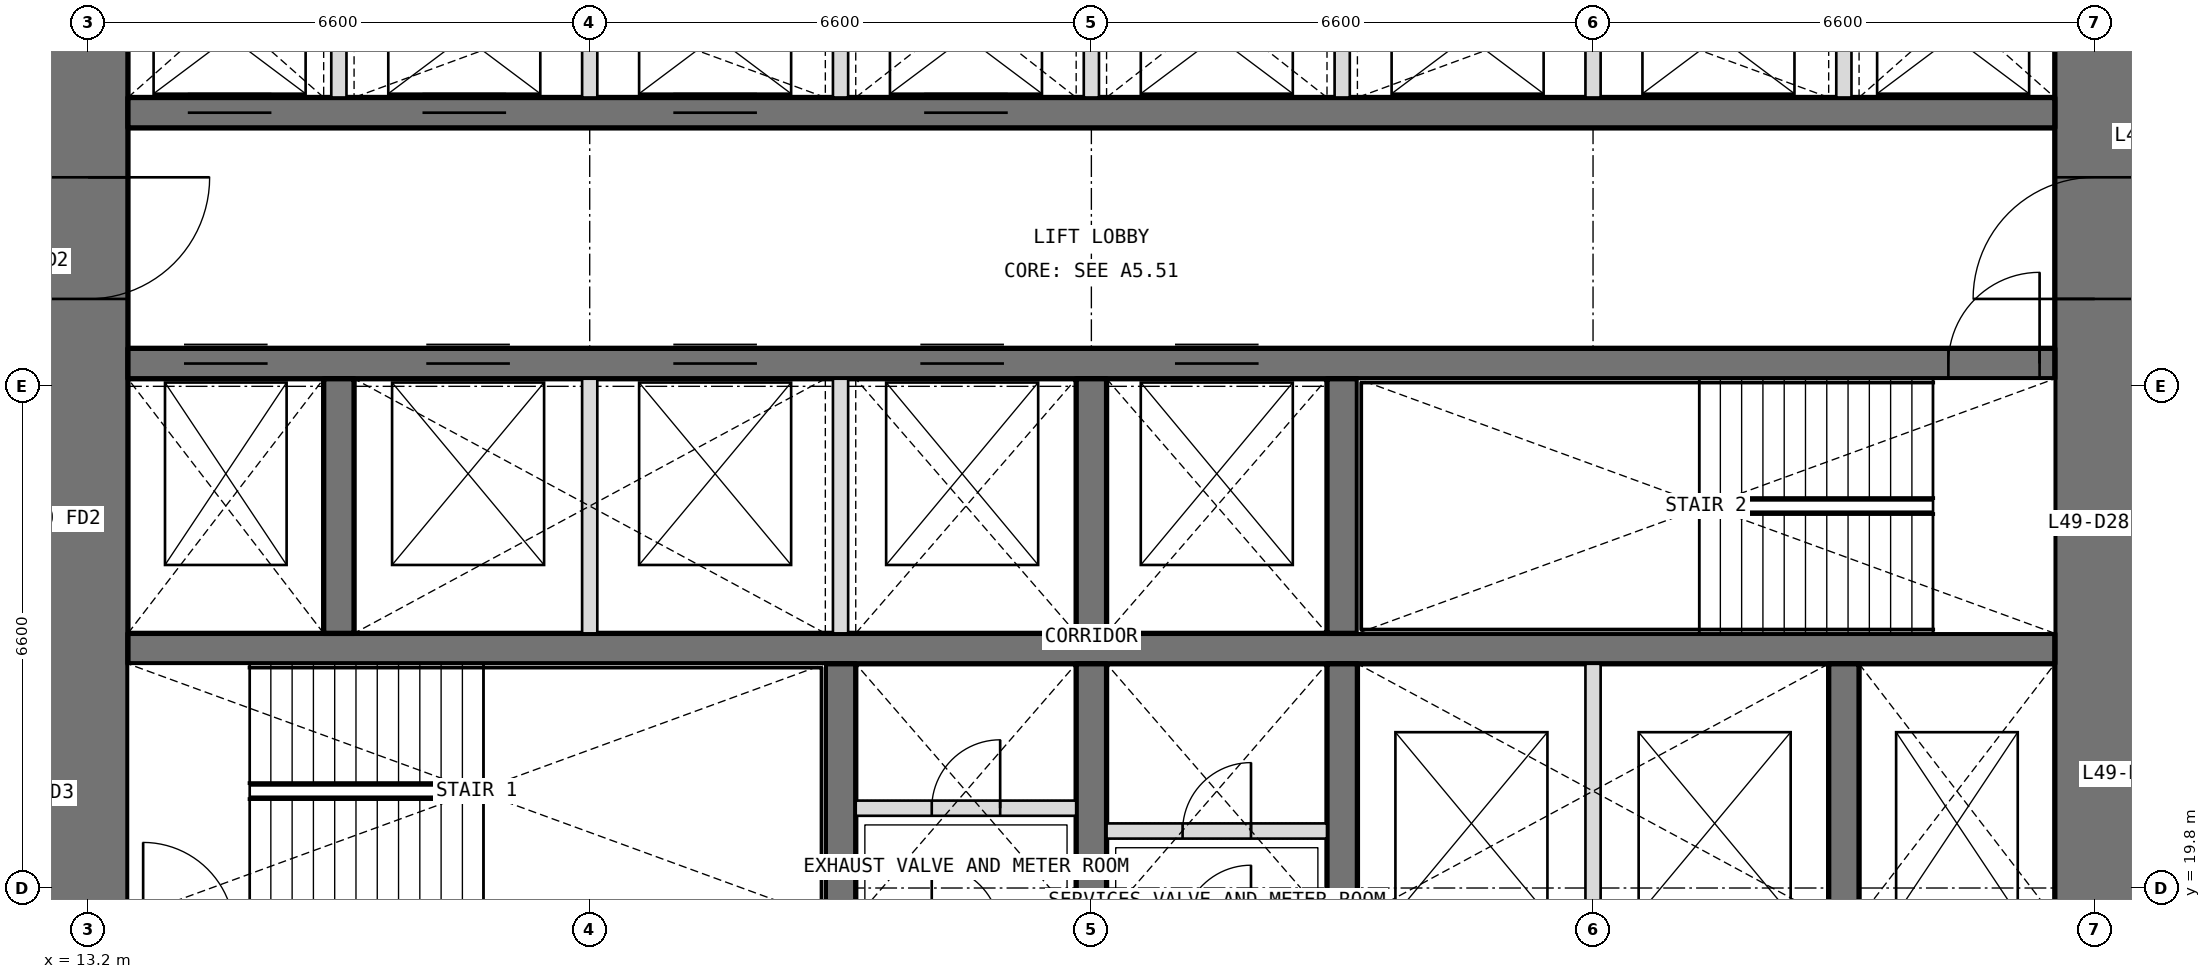
"""IFC4 building model, lengths in metres.
Left out: names, types, materials, properties, quantities, classifications, styles, units other than length and angle.
Written with IfcOpenShell. Run it as: python <this file> out.ifc"""

import sys

from ifc_helpers import new_model, si_unit, direction, frame, frame_2d, origin, place, context, subcontext, project, spatial, rectangle, extrude, element, fill, save


model = new_model("IFC4")
c1 = context("Model", 3, precision=1e-05, world=origin(), true_north=direction((0.0, 1.0)))
c2 = subcontext(c1, "Body", "Model", "MODEL_VIEW")
j1 = project(units=[si_unit("LENGTHUNIT", "METRE"), si_unit("PLANEANGLEUNIT", "RADIAN")], contexts=[c1])
p1 = place(None, origin())
s1 = spatial("IfcSite", under=j1, at=p1, CompositionType="ELEMENT")
p2 = place(p1, origin())
s2 = spatial("IfcBuilding", under=s1, at=p2, CompositionType="ELEMENT")
p3 = place(p2, frame((0.0, 0.0, 214.5)))
s3 = spatial("IfcBuildingStorey", under=s2, at=p3, CompositionType="ELEMENT", Elevation=214.5)
p4 = place(p3, frame((39.6, 13.725, 0.0), z_axis=(0.0, 0.0, 1.0), x_axis=(0.0, 1.0, 0.0)))
e1 = element("IfcWall", 1, at=p4, inside=s3, PredefinedType="SHEAR", context=c2, shape_type="SweptSolid", body=[
    extrude(rectangle(XDim=18.75, YDim=1.05, at=frame_2d((9.375, 0.0))), origin(), (0.0, 0.0, 1.0), 4.2),
])
p5 = place(p4, frame((3.025, 0.0, 0.0)))
e2 = element("IfcOpeningElement", 2, at=p5, cuts=e1, PredefinedType="OPENING", context=c2, shape_type="SweptSolid", body=[
    extrude(rectangle(XDim=1.6, YDim=2.1, at=frame_2d((0.8, 1.05))), frame((0.0, 0.535, 0.0), z_axis=(0.0, -1.0, 0.0), x_axis=(1.0, 0.0, 0.0)), (0.0, 0.0, 1.0), 1.07),
])
p6 = place(p4, frame((13.825, 0.0, 0.0)))
e3 = element("IfcOpeningElement", 3, at=p6, cuts=e1, PredefinedType="OPENING", context=c2, shape_type="SweptSolid", body=[
    extrude(rectangle(XDim=1.6, YDim=2.1, at=frame_2d((0.8, 1.05))), frame((0.0, 0.535, 0.0), z_axis=(0.0, -1.0, 0.0), x_axis=(1.0, 0.0, 0.0)), (0.0, 0.0, 1.0), 1.07),
])
p7 = place(p3, frame((13.2, 32.475, 0.0), z_axis=(0.0, 0.0, 1.0), x_axis=(0.0, -1.0, 0.0)))
e4 = element("IfcWall", 4, at=p7, inside=s3, PredefinedType="SHEAR", context=c2, shape_type="SweptSolid", body=[
    extrude(rectangle(XDim=18.75, YDim=1.05, at=frame_2d((9.375, 0.0))), origin(), (0.0, 0.0, 1.0), 4.2),
])
p8 = place(p7, frame((14.125, 0.0, 0.0)))
e5 = element("IfcOpeningElement", 5, at=p8, cuts=e4, PredefinedType="OPENING", context=c2, shape_type="SweptSolid", body=[
    extrude(rectangle(XDim=1.6, YDim=2.1, at=frame_2d((0.8, 1.05))), frame((0.0, 0.535, 0.0), z_axis=(0.0, -1.0, 0.0), x_axis=(1.0, 0.0, 0.0)), (0.0, 0.0, 1.0), 1.07),
])
p9 = place(p7, frame((3.325, 0.0, 0.0)))
e6 = element("IfcOpeningElement", 6, at=p9, cuts=e4, PredefinedType="OPENING", context=c2, shape_type="SweptSolid", body=[
    extrude(rectangle(XDim=1.6, YDim=2.1, at=frame_2d((0.8, 1.05))), frame((0.0, 0.535, 0.0), z_axis=(0.0, -1.0, 0.0), x_axis=(1.0, 0.0, 0.0)), (0.0, 0.0, 1.0), 1.07),
])
p10 = place(p3, frame((13.725, 22.95, 0.0), z_axis=(0.0, 0.0, 1.0), x_axis=(1.0, 0.0, 0.0)))
e7 = element("IfcWall", 7, at=p10, inside=s3, PredefinedType="SHEAR", context=c2, shape_type="SweptSolid", body=[
    extrude(rectangle(XDim=25.35, YDim=0.4, at=frame_2d((12.675, 0.0))), origin(), (0.0, 0.0, 1.0), 4.2),
])
p11 = place(p3, frame((13.725, 26.7, 0.0), z_axis=(0.0, 0.0, 1.0), x_axis=(1.0, 0.0, 0.0)))
e8 = element("IfcWall", 8, at=p11, inside=s3, PredefinedType="SHEAR", context=c2, shape_type="SweptSolid", body=[
    extrude(rectangle(XDim=25.35, YDim=0.4, at=frame_2d((12.675, 0.0))), origin(), (0.0, 0.0, 1.0), 4.2),
])
p12 = place(p11, frame((23.95, 0.0, 0.0)))
e9 = element("IfcOpeningElement", 9, at=p12, cuts=e8, PredefinedType="OPENING", context=c2, shape_type="SweptSolid", body=[
    extrude(rectangle(XDim=1.2, YDim=2.1, at=frame_2d((0.6, 1.05))), frame((0.0, 0.21, 0.0), z_axis=(0.0, -1.0, 0.0), x_axis=(1.0, 0.0, 0.0)), (0.0, 0.0, 1.0), 0.42),
])
p13 = place(p11, frame((0.738, 0.0, 0.0)))
e10 = element("IfcOpeningElement", 10, at=p13, cuts=e8, PredefinedType="OPENING", context=c2, shape_type="SweptSolid", body=[
    extrude(rectangle(XDim=1.1, YDim=2.1, at=frame_2d((0.55, 1.05))), frame((0.0, 0.21, 0.0), z_axis=(0.0, -1.0, 0.0), x_axis=(1.0, 0.0, 0.0)), (0.0, 0.0, 1.0), 0.42),
])
p14 = place(p11, frame((3.925, 0.0, 0.0)))
e11 = element("IfcOpeningElement", 11, at=p14, cuts=e8, PredefinedType="OPENING", context=c2, shape_type="SweptSolid", body=[
    extrude(rectangle(XDim=1.1, YDim=2.1, at=frame_2d((0.55, 1.05))), frame((0.0, 0.21, 0.0), z_axis=(0.0, -1.0, 0.0), x_axis=(1.0, 0.0, 0.0)), (0.0, 0.0, 1.0), 0.42),
])
p15 = place(p11, frame((7.175, 0.0, 0.0)))
e12 = element("IfcOpeningElement", 12, at=p15, cuts=e8, PredefinedType="OPENING", context=c2, shape_type="SweptSolid", body=[
    extrude(rectangle(XDim=1.1, YDim=2.1, at=frame_2d((0.55, 1.05))), frame((0.0, 0.21, 0.0), z_axis=(0.0, -1.0, 0.0), x_axis=(1.0, 0.0, 0.0)), (0.0, 0.0, 1.0), 0.42),
])
p16 = place(p11, frame((10.425, 0.0, 0.0)))
e13 = element("IfcOpeningElement", 13, at=p16, cuts=e8, PredefinedType="OPENING", context=c2, shape_type="SweptSolid", body=[
    extrude(rectangle(XDim=1.1, YDim=2.1, at=frame_2d((0.55, 1.05))), frame((0.0, 0.21, 0.0), z_axis=(0.0, -1.0, 0.0), x_axis=(1.0, 0.0, 0.0)), (0.0, 0.0, 1.0), 0.42),
])
p17 = place(p11, frame((13.775, 0.0, 0.0)))
e14 = element("IfcOpeningElement", 14, at=p17, cuts=e8, PredefinedType="OPENING", context=c2, shape_type="SweptSolid", body=[
    extrude(rectangle(XDim=1.1, YDim=2.1, at=frame_2d((0.55, 1.05))), frame((0.0, 0.21, 0.0), z_axis=(0.0, -1.0, 0.0), x_axis=(1.0, 0.0, 0.0)), (0.0, 0.0, 1.0), 0.42),
])
p18 = place(p3, frame((13.725, 30.0, 0.0), z_axis=(0.0, 0.0, 1.0), x_axis=(1.0, 0.0, 0.0)))
e15 = element("IfcWall", 15, at=p18, inside=s3, PredefinedType="SHEAR", context=c2, shape_type="SweptSolid", body=[
    extrude(rectangle(XDim=25.35, YDim=0.4, at=frame_2d((12.675, 0.0))), origin(), (0.0, 0.0, 1.0), 4.2),
])
p19 = place(p18, frame((0.788, 0.0, 0.0)))
e16 = element("IfcOpeningElement", 16, at=p19, cuts=e15, PredefinedType="OPENING", context=c2, shape_type="SweptSolid", body=[
    extrude(rectangle(XDim=1.1, YDim=2.1, at=frame_2d((0.55, 1.05))), frame((0.0, 0.21, 0.0), z_axis=(0.0, -1.0, 0.0), x_axis=(1.0, 0.0, 0.0)), (0.0, 0.0, 1.0), 0.42),
])
p20 = place(p18, frame((3.875, 0.0, 0.0)))
e17 = element("IfcOpeningElement", 17, at=p20, cuts=e15, PredefinedType="OPENING", context=c2, shape_type="SweptSolid", body=[
    extrude(rectangle(XDim=1.1, YDim=2.1, at=frame_2d((0.55, 1.05))), frame((0.0, 0.21, 0.0), z_axis=(0.0, -1.0, 0.0), x_axis=(1.0, 0.0, 0.0)), (0.0, 0.0, 1.0), 0.42),
])
p21 = place(p18, frame((7.175, 0.0, 0.0)))
e18 = element("IfcOpeningElement", 18, at=p21, cuts=e15, PredefinedType="OPENING", context=c2, shape_type="SweptSolid", body=[
    extrude(rectangle(XDim=1.1, YDim=2.1, at=frame_2d((0.55, 1.05))), frame((0.0, 0.21, 0.0), z_axis=(0.0, -1.0, 0.0), x_axis=(1.0, 0.0, 0.0)), (0.0, 0.0, 1.0), 0.42),
])
p22 = place(p18, frame((10.475, 0.0, 0.0)))
e19 = element("IfcOpeningElement", 19, at=p22, cuts=e15, PredefinedType="OPENING", context=c2, shape_type="SweptSolid", body=[
    extrude(rectangle(XDim=1.1, YDim=2.1, at=frame_2d((0.55, 1.05))), frame((0.0, 0.21, 0.0), z_axis=(0.0, -1.0, 0.0), x_axis=(1.0, 0.0, 0.0)), (0.0, 0.0, 1.0), 0.42),
])
for number, where, z_axis, x_axis in (
    (20, (23.1, 19.4, 0.0), (0.0, 0.0, 1.0), (0.0, 1.0, 0.0)),
    (21, (26.4, 19.4, 0.0), (0.0, 0.0, 1.0), (0.0, 1.0, 0.0)),
    (22, (29.7, 19.4, 0.0), (0.0, 0.0, 1.0), (0.0, 1.0, 0.0)),
    (23, (36.3, 19.4, 0.0), (0.0, 0.0, 1.0), (0.0, 1.0, 0.0)),
    (24, (16.5, 23.15, 0.0), (0.0, 0.0, 1.0), (0.0, 1.0, 0.0)),
    (25, (26.4, 23.15, 0.0), (0.0, 0.0, 1.0), (0.0, 1.0, 0.0)),
    (26, (29.7, 23.15, 0.0), (0.0, 0.0, 1.0), (0.0, 1.0, 0.0)),
):
    element("IfcWall", number, at=place(p3, frame(where, z_axis=z_axis, x_axis=x_axis)), inside=s3, PredefinedType="SHEAR", context=c2, shape_type="SweptSolid", body=[
        extrude(rectangle(XDim=3.35, YDim=0.4, at=frame_2d((1.675, 0.0))), origin(), (0.0, 0.0, 1.0), 4.2),
    ])
for number, where, z_axis, x_axis in (
    (27, (16.5, 30.2, 0.0), (0.0, 0.0, 1.0), (0.0, 1.0, 0.0)),
    (28, (19.8, 30.2, 0.0), (0.0, 0.0, 1.0), (0.0, 1.0, 0.0)),
    (29, (23.1, 30.2, 0.0), (0.0, 0.0, 1.0), (0.0, 1.0, 0.0)),
    (30, (26.4, 30.2, 0.0), (0.0, 0.0, 1.0), (0.0, 1.0, 0.0)),
    (31, (29.7, 30.2, 0.0), (0.0, 0.0, 1.0), (0.0, 1.0, 0.0)),
    (32, (33.0, 30.2, 0.0), (0.0, 0.0, 1.0), (0.0, 1.0, 0.0)),
    (33, (36.3, 30.2, 0.0), (0.0, 0.0, 1.0), (0.0, 1.0, 0.0)),
):
    element("IfcWall", number, at=place(p3, frame(where, z_axis=z_axis, x_axis=x_axis)), inside=s3, PredefinedType="PARTITIONING", context=c2, shape_type="SweptSolid", body=[
        extrude(rectangle(XDim=2.275, YDim=0.2, at=frame_2d((1.138, 0.0))), origin(), (0.0, 0.0, 1.0), 4.2),
    ])
for number, where, z_axis, x_axis in (
    (34, (33.0, 19.4, 0.0), (0.0, 0.0, 1.0), (0.0, 1.0, 0.0)),
    (35, (19.8, 23.15, 0.0), (0.0, 0.0, 1.0), (0.0, 1.0, 0.0)),
    (36, (23.1, 23.15, 0.0), (0.0, 0.0, 1.0), (0.0, 1.0, 0.0)),
):
    element("IfcWall", number, at=place(p3, frame(where, z_axis=z_axis, x_axis=x_axis)), inside=s3, PredefinedType="PARTITIONING", context=c2, shape_type="SweptSolid", body=[
        extrude(rectangle(XDim=3.35, YDim=0.2, at=frame_2d((1.675, 0.0))), origin(), (0.0, 0.0, 1.0), 4.2),
    ])
p23 = place(p3, frame((23.3, 20.85, 0.0), z_axis=(0.0, 0.0, 1.0), x_axis=(1.0, 0.0, 0.0)))
e37 = element("IfcWall", 37, at=p23, inside=s3, PredefinedType="PARTITIONING", context=c2, shape_type="SweptSolid", body=[
    extrude(rectangle(XDim=2.9, YDim=0.2, at=frame_2d((1.45, 0.0))), origin(), (0.0, 0.0, 1.0), 3.9),
])
p24 = place(p23, frame((1.0, 0.0, 0.0)))
e38 = element("IfcOpeningElement", 38, at=p24, cuts=e37, PredefinedType="OPENING", context=c2, shape_type="SweptSolid", body=[
    extrude(rectangle(XDim=0.9, YDim=2.1, at=frame_2d((0.45, 1.05))), frame((0.0, 0.11, 0.0), z_axis=(0.0, -1.0, 0.0), x_axis=(1.0, 0.0, 0.0)), (0.0, 0.0, 1.0), 0.22),
])
p25 = place(p3, frame((26.6, 20.55, 0.0), z_axis=(0.0, 0.0, 1.0), x_axis=(1.0, 0.0, 0.0)))
e39 = element("IfcWall", 39, at=p25, inside=s3, PredefinedType="PARTITIONING", context=c2, shape_type="SweptSolid", body=[
    extrude(rectangle(XDim=2.9, YDim=0.2, at=frame_2d((1.45, 0.0))), origin(), (0.0, 0.0, 1.0), 3.9),
])
p26 = place(p25, frame((1.0, 0.0, 0.0)))
e40 = element("IfcOpeningElement", 40, at=p26, cuts=e39, PredefinedType="OPENING", context=c2, shape_type="SweptSolid", body=[
    extrude(rectangle(XDim=0.9, YDim=2.1, at=frame_2d((0.45, 1.05))), frame((0.0, 0.11, 0.0), z_axis=(0.0, -1.0, 0.0), x_axis=(1.0, 0.0, 0.0)), (0.0, 0.0, 1.0), 0.22),
])
p27 = place(p24, origin())
e41 = element("IfcDoor", 41, at=p27, inside=s3, OperationType="SINGLE_SWING_RIGHT", PredefinedType="DOOR", context=c2, shape_type="SweptSolid", body=[
    extrude(rectangle(XDim=0.9, YDim=2.1, at=frame_2d((0.45, 1.05))), frame((0.0, 0.025, 0.0), z_axis=(0.0, -1.0, 0.0), x_axis=(1.0, 0.0, 0.0)), (0.0, 0.0, 1.0), 0.05),
])
fill(e38, e41)
p28 = place(p26, origin())
e42 = element("IfcDoor", 42, at=p28, inside=s3, OperationType="SINGLE_SWING_RIGHT", PredefinedType="DOOR", context=c2, shape_type="SweptSolid", body=[
    extrude(rectangle(XDim=0.9, YDim=2.1, at=frame_2d((0.45, 1.05))), frame((0.0, 0.025, 0.0), z_axis=(0.0, -1.0, 0.0), x_axis=(1.0, 0.0, 0.0)), (0.0, 0.0, 1.0), 0.05),
])
fill(e40, e42)
p29 = place(p12, origin())
e43 = element("IfcDoor", 43, at=p29, inside=s3, OperationType="SINGLE_SWING_RIGHT", PredefinedType="DOOR", context=c2, shape_type="SweptSolid", body=[
    extrude(rectangle(XDim=1.2, YDim=2.1, at=frame_2d((0.6, 1.05))), frame((0.0, 0.025, 0.0), z_axis=(0.0, -1.0, 0.0), x_axis=(1.0, 0.0, 0.0)), (0.0, 0.0, 1.0), 0.05),
])
fill(e9, e43)
p30 = place(p9, origin())
e44 = element("IfcDoor", 44, at=p30, inside=s3, OperationType="DOUBLE_DOOR_DOUBLE_SWING", PredefinedType="DOOR", context=c2, shape_type="SweptSolid", body=[
    extrude(rectangle(XDim=1.6, YDim=2.1, at=frame_2d((0.8, 1.05))), frame((0.0, 0.025, 0.0), z_axis=(0.0, -1.0, 0.0), x_axis=(1.0, 0.0, 0.0)), (0.0, 0.0, 1.0), 0.05),
])
fill(e6, e44)
p31 = place(p6, origin())
e45 = element("IfcDoor", 45, at=p31, inside=s3, OperationType="DOUBLE_DOOR_DOUBLE_SWING", PredefinedType="DOOR", context=c2, shape_type="SweptSolid", body=[
    extrude(rectangle(XDim=1.6, YDim=2.1, at=frame_2d((0.8, 1.05))), frame((0.0, 0.025, 0.0), z_axis=(0.0, -1.0, 0.0), x_axis=(1.0, 0.0, 0.0)), (0.0, 0.0, 1.0), 0.05),
])
fill(e3, e45)
p32 = place(p19, origin())
e46 = element("IfcDoor", 46, at=p32, inside=s3, OperationType="DOUBLE_DOOR_SLIDING", PredefinedType="DOOR", context=c2, shape_type="SweptSolid", body=[
    extrude(rectangle(XDim=1.1, YDim=2.1, at=frame_2d((0.55, 1.05))), frame((0.0, 0.025, 0.0), z_axis=(0.0, -1.0, 0.0), x_axis=(1.0, 0.0, 0.0)), (0.0, 0.0, 1.0), 0.05),
])
fill(e16, e46)
p33 = place(p20, origin())
e47 = element("IfcDoor", 47, at=p33, inside=s3, OperationType="DOUBLE_DOOR_SLIDING", PredefinedType="DOOR", context=c2, shape_type="SweptSolid", body=[
    extrude(rectangle(XDim=1.1, YDim=2.1, at=frame_2d((0.55, 1.05))), frame((0.0, 0.025, 0.0), z_axis=(0.0, -1.0, 0.0), x_axis=(1.0, 0.0, 0.0)), (0.0, 0.0, 1.0), 0.05),
])
fill(e17, e47)
p34 = place(p21, origin())
e48 = element("IfcDoor", 48, at=p34, inside=s3, OperationType="DOUBLE_DOOR_SLIDING", PredefinedType="DOOR", context=c2, shape_type="SweptSolid", body=[
    extrude(rectangle(XDim=1.1, YDim=2.1, at=frame_2d((0.55, 1.05))), frame((0.0, 0.025, 0.0), z_axis=(0.0, -1.0, 0.0), x_axis=(1.0, 0.0, 0.0)), (0.0, 0.0, 1.0), 0.05),
])
fill(e18, e48)
p35 = place(p22, origin())
e49 = element("IfcDoor", 49, at=p35, inside=s3, OperationType="DOUBLE_DOOR_SLIDING", PredefinedType="DOOR", context=c2, shape_type="SweptSolid", body=[
    extrude(rectangle(XDim=1.1, YDim=2.1, at=frame_2d((0.55, 1.05))), frame((0.0, 0.025, 0.0), z_axis=(0.0, -1.0, 0.0), x_axis=(1.0, 0.0, 0.0)), (0.0, 0.0, 1.0), 0.05),
])
fill(e19, e49)
p36 = place(p13, origin())
e50 = element("IfcDoor", 50, at=p36, inside=s3, OperationType="DOUBLE_DOOR_SLIDING", PredefinedType="DOOR", context=c2, shape_type="SweptSolid", body=[
    extrude(rectangle(XDim=1.1, YDim=2.1, at=frame_2d((0.55, 1.05))), frame((0.0, 0.025, 0.0), z_axis=(0.0, -1.0, 0.0), x_axis=(1.0, 0.0, 0.0)), (0.0, 0.0, 1.0), 0.05),
])
fill(e10, e50)
p37 = place(p14, origin())
e51 = element("IfcDoor", 51, at=p37, inside=s3, OperationType="DOUBLE_DOOR_SLIDING", PredefinedType="DOOR", context=c2, shape_type="SweptSolid", body=[
    extrude(rectangle(XDim=1.1, YDim=2.1, at=frame_2d((0.55, 1.05))), frame((0.0, 0.025, 0.0), z_axis=(0.0, -1.0, 0.0), x_axis=(1.0, 0.0, 0.0)), (0.0, 0.0, 1.0), 0.05),
])
fill(e11, e51)
p38 = place(p15, origin())
e52 = element("IfcDoor", 52, at=p38, inside=s3, OperationType="DOUBLE_DOOR_SLIDING", PredefinedType="DOOR", context=c2, shape_type="SweptSolid", body=[
    extrude(rectangle(XDim=1.1, YDim=2.1, at=frame_2d((0.55, 1.05))), frame((0.0, 0.025, 0.0), z_axis=(0.0, -1.0, 0.0), x_axis=(1.0, 0.0, 0.0)), (0.0, 0.0, 1.0), 0.05),
])
fill(e12, e52)
p39 = place(p16, origin())
e53 = element("IfcDoor", 53, at=p39, inside=s3, OperationType="DOUBLE_DOOR_SLIDING", PredefinedType="DOOR", context=c2, shape_type="SweptSolid", body=[
    extrude(rectangle(XDim=1.1, YDim=2.1, at=frame_2d((0.55, 1.05))), frame((0.0, 0.025, 0.0), z_axis=(0.0, -1.0, 0.0), x_axis=(1.0, 0.0, 0.0)), (0.0, 0.0, 1.0), 0.05),
])
fill(e13, e53)
p40 = place(p17, origin())
e54 = element("IfcDoor", 54, at=p40, inside=s3, OperationType="DOUBLE_DOOR_SLIDING", PredefinedType="DOOR", context=c2, shape_type="SweptSolid", body=[
    extrude(rectangle(XDim=1.1, YDim=2.1, at=frame_2d((0.55, 1.05))), frame((0.0, 0.025, 0.0), z_axis=(0.0, -1.0, 0.0), x_axis=(1.0, 0.0, 0.0)), (0.0, 0.0, 1.0), 0.05),
])
fill(e14, e54)
save(model, sys.argv[1])
